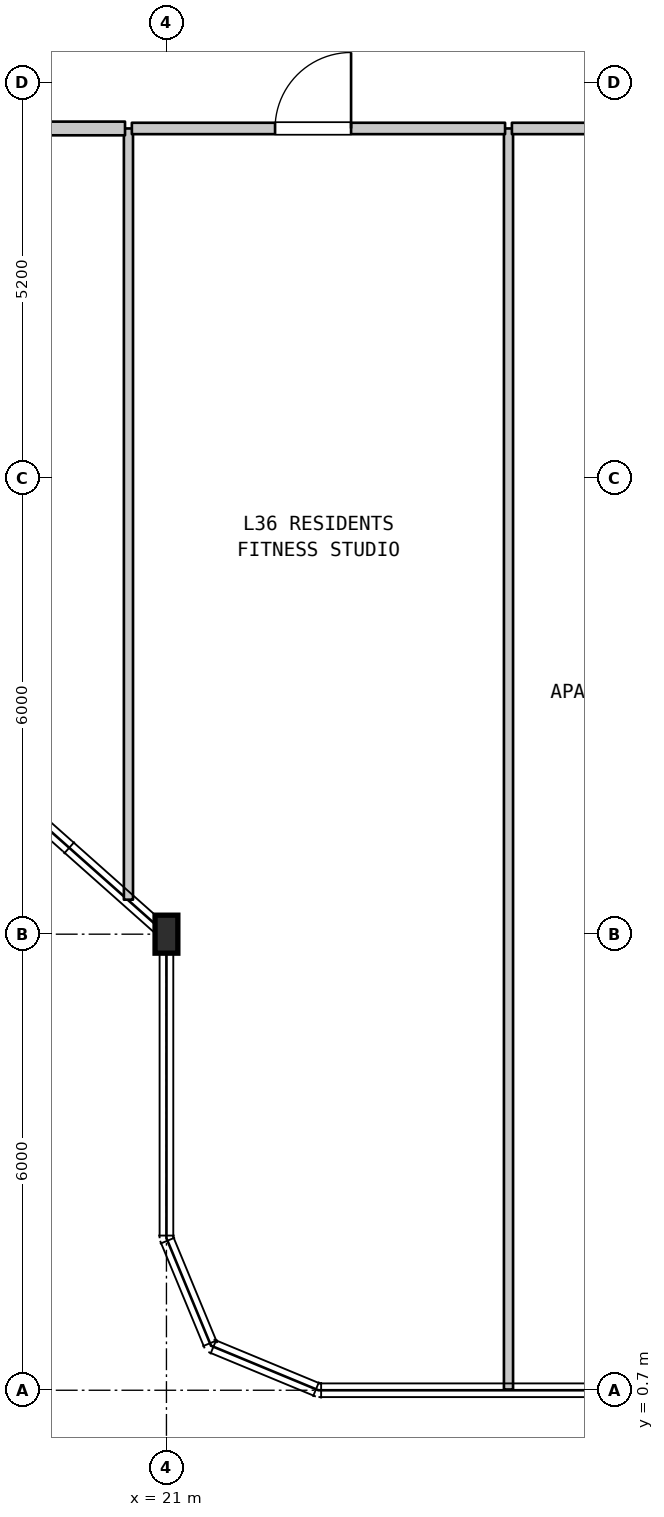
"""IFC4 building model, lengths in metres.
Left out: names, types, materials, properties, quantities, classifications, styles, units other than length and angle.
Written with IfcOpenShell. Run it as: python <this file> out.ifc"""

import sys

from ifc_helpers import new_model, si_unit, direction, frame, frame_2d, origin, origin_2d, place, context, subcontext, project, spatial, rectangle, i_section, extrude, element, fill, save


model = new_model("IFC4")
c1 = context("Model", 3, precision=1e-05, world=origin(), true_north=direction((0.0, 1.0)))
c2 = subcontext(c1, "Body", "Model", "MODEL_VIEW")
j1 = project(units=[si_unit("LENGTHUNIT", "METRE"), si_unit("PLANEANGLEUNIT", "RADIAN")], contexts=[c1])
p1 = place(None, origin())
s1 = spatial("IfcSite", under=j1, at=p1, CompositionType="ELEMENT")
p2 = place(p1, origin())
s2 = spatial("IfcBuilding", under=s1, at=p2, CompositionType="ELEMENT")
p3 = place(p2, frame((0.0, 0.0, 148.3)))
s3 = spatial("IfcBuildingStorey", under=s2, at=p3, CompositionType="ELEMENT", Elevation=148.3)
p4 = place(p3, frame((21.0, 6.7, 0.0), z_axis=(0.0, 0.0, 1.0), x_axis=(1.0, 0.0, 0.0)))
e1 = element("IfcColumn", 1, at=p4, inside=s3, PredefinedType="COLUMN", context=c2, shape_type="SweptSolid", body=[
    extrude(i_section(OverallWidth=0.3, OverallDepth=0.5, WebThickness=0.014, FlangeThickness=0.028, FilletRadius=0.027, at=origin_2d()), origin(), (0.0, 0.0, 1.0), 3.7),
])
p5 = place(p3, frame((20.5, 7.154, 0.0), z_axis=(0.0, 0.0, 1.0), x_axis=(0.0, 1.0, 0.0)))
e2 = element("IfcWall", 2, at=p5, inside=s3, PredefinedType="PARTITIONING", context=c2, shape_type="SweptSolid", body=[
    extrude(rectangle(XDim=10.146, YDim=0.12, at=frame_2d((5.073, 0.0))), origin(), (0.0, 0.0, 1.0), 3.385),
])
p6 = place(p3, frame((25.5, 0.71, 0.0), z_axis=(0.0, 0.0, 1.0), x_axis=(0.0, 1.0, 0.0)))
e3 = element("IfcWall", 3, at=p6, inside=s3, PredefinedType="PARTITIONING", context=c2, shape_type="SweptSolid", body=[
    extrude(rectangle(XDim=16.59, YDim=0.12, at=frame_2d((8.295, 0.0))), origin(), (0.0, 0.0, 1.0), 3.385),
])
p7 = place(p3, frame((18.595, 17.3, 0.0), z_axis=(0.0, 0.0, 1.0), x_axis=(1.0, 0.0, 0.0)))
e4 = element("IfcWall", 4, at=p7, inside=s3, PredefinedType="STANDARD", context=c2, shape_type="SweptSolid", body=[
    extrude(rectangle(XDim=1.86, YDim=0.18, at=frame_2d((0.93, 0.0))), origin(), (0.0, 0.0, 1.0), 3.385),
])
p8 = place(p3, frame((20.545, 17.3, 0.0), z_axis=(0.0, 0.0, 1.0), x_axis=(1.0, 0.0, 0.0)))
e5 = element("IfcWall", 5, at=p8, inside=s3, PredefinedType="STANDARD", context=c2, shape_type="SweptSolid", body=[
    extrude(rectangle(XDim=4.91, YDim=0.15, at=frame_2d((2.455, 0.0))), origin(), (0.0, 0.0, 1.0), 3.385),
])
p9 = place(p8, frame((1.884, 0.0, 0.0)))
e6 = element("IfcOpeningElement", 6, at=p9, cuts=e5, PredefinedType="OPENING", context=c2, shape_type="SweptSolid", body=[
    extrude(rectangle(XDim=1.0, YDim=2.15, at=frame_2d((0.5, 1.075))), frame((0.0, 0.085, 0.0), z_axis=(0.0, -1.0, 0.0), x_axis=(1.0, 0.0, 0.0)), (0.0, 0.0, 1.0), 0.17),
])
p10 = place(p3, frame((25.545, 17.3, 0.0), z_axis=(0.0, 0.0, 1.0), x_axis=(1.0, 0.0, 0.0)))
e7 = element("IfcWall", 7, at=p10, inside=s3, PredefinedType="STANDARD", context=c2, shape_type="SweptSolid", body=[
    extrude(rectangle(XDim=4.21, YDim=0.15, at=frame_2d((2.105, 0.0))), origin(), (0.0, 0.0, 1.0), 3.385),
])
p11 = place(p10, frame((1.605, 0.0, 0.0)))
e8 = element("IfcOpeningElement", 8, at=p11, cuts=e7, PredefinedType="OPENING", context=c2, shape_type="SweptSolid", body=[
    extrude(rectangle(XDim=1.0, YDim=2.15, at=frame_2d((0.5, 1.075))), frame((0.0, 0.085, 0.0), z_axis=(0.0, -1.0, 0.0), x_axis=(1.0, 0.0, 0.0)), (0.0, 0.0, 1.0), 0.17),
])
p12 = place(p9, origin())
e9 = element("IfcDoor", 9, at=p12, inside=s3, OperationType="SINGLE_SWING_RIGHT", PredefinedType="DOOR", context=c2, shape_type="SweptSolid", body=[
    extrude(rectangle(XDim=1.0, YDim=2.15, at=frame_2d((0.5, 1.075))), frame((0.0, 0.025, 0.0), z_axis=(0.0, -1.0, 0.0), x_axis=(1.0, 0.0, 0.0)), (0.0, 0.0, 1.0), 0.05),
])
fill(e6, e9)
save(model, sys.argv[1])
